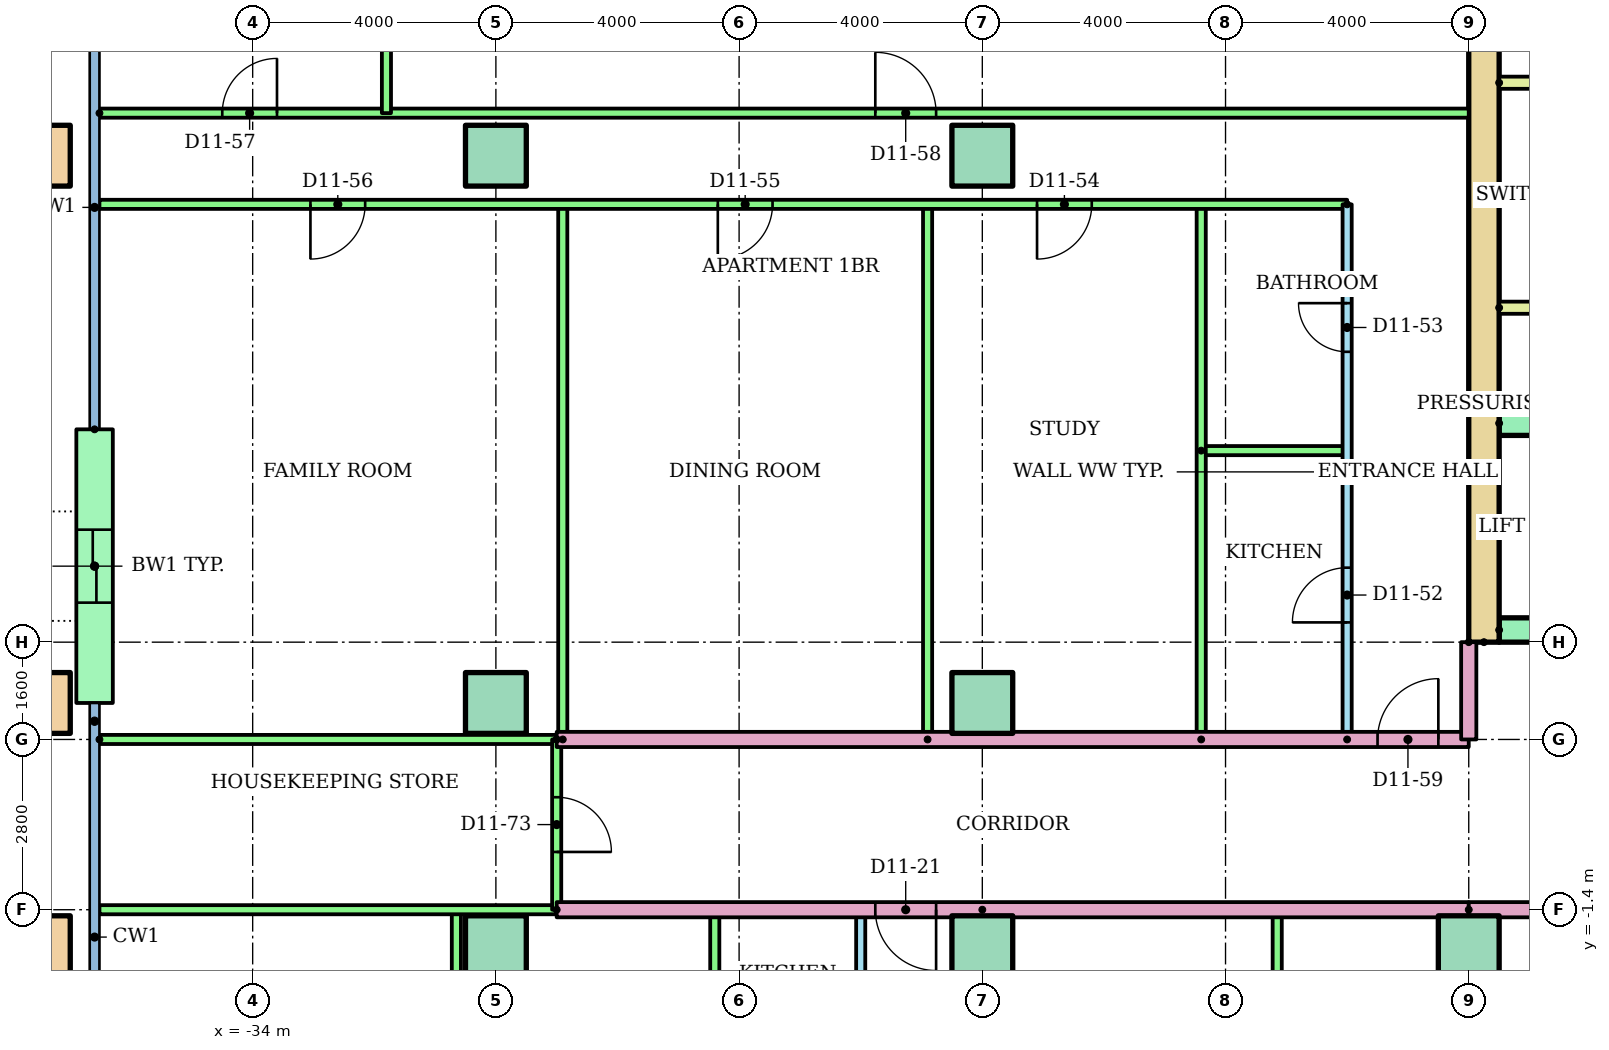
"""IFC4 building model, lengths in metres.
Left out: names, types, materials, properties, quantities, classifications, styles, units other than length and angle.
Written with IfcOpenShell. Run it as: python <this file> out.ifc"""

import sys

from ifc_helpers import new_model, si_unit, direction, frame, frame_2d, origin, origin_2d, place, context, subcontext, project, spatial, rectangle, hollow_rectangle, extrude, element, fill, save


model = new_model("IFC4")
c1 = context("Model", 3, precision=1e-05, world=origin(), true_north=direction((0.0, 1.0)))
c2 = subcontext(c1, "Body", "Model", "MODEL_VIEW")
j1 = project(units=[si_unit("LENGTHUNIT", "METRE"), si_unit("PLANEANGLEUNIT", "RADIAN")], contexts=[c1])
p1 = place(None, origin())
s1 = spatial("IfcSite", under=j1, at=p1, CompositionType="ELEMENT")
p2 = place(p1, origin())
s2 = spatial("IfcBuilding", under=s1, at=p2, CompositionType="ELEMENT")
p3 = place(p2, frame((0.0, 0.0, 44.8)))
s3 = spatial("IfcBuildingStorey", under=s2, at=p3, CompositionType="ELEMENT", Elevation=44.8)
p4 = place(p3, frame((-37.5, -2.0, 0.0)))
e1 = element("IfcColumn", 1, at=p4, inside=s3, PredefinedType="COLUMN", context=c2, shape_type="SweptSolid", body=[
    extrude(hollow_rectangle(XDim=1.0, YDim=1.0, WallThickness=0.05, at=origin_2d()), origin(), (0.0, 0.0, 1.0), 3.2),
])
for number, where in (
    (2, (-30.0, -2.0, 0.0)),
    (3, (-22.0, -2.0, 0.0)),
    (4, (-14.0, -2.0, 0.0)),
):
    element("IfcColumn", number, at=place(p3, frame(where)), inside=s3, PredefinedType="COLUMN", context=c2, shape_type="SweptSolid", body=[
        extrude(rectangle(XDim=1.0, YDim=1.0, at=origin_2d()), origin(), (0.0, 0.0, 1.0), 3.2),
    ])
p5 = place(p3, frame((-37.5, 2.0, 0.0)))
e5 = element("IfcColumn", 5, at=p5, inside=s3, PredefinedType="COLUMN", context=c2, shape_type="SweptSolid", body=[
    extrude(hollow_rectangle(XDim=1.0, YDim=1.0, WallThickness=0.05, at=origin_2d()), origin(), (0.0, 0.0, 1.0), 3.2),
])
for number, where in (
    (6, (-30.0, 2.0, 0.0)),
    (7, (-22.0, 2.0, 0.0)),
):
    element("IfcColumn", number, at=place(p3, frame(where)), inside=s3, PredefinedType="COLUMN", context=c2, shape_type="SweptSolid", body=[
        extrude(rectangle(XDim=1.0, YDim=1.0, at=origin_2d()), origin(), (0.0, 0.0, 1.0), 3.2),
    ])
p6 = place(p3, frame((-37.5, 11.0, 0.0)))
e8 = element("IfcColumn", 8, at=p6, inside=s3, PredefinedType="COLUMN", context=c2, shape_type="SweptSolid", body=[
    extrude(hollow_rectangle(XDim=1.0, YDim=1.0, WallThickness=0.05, at=origin_2d()), origin(), (0.0, 0.0, 1.0), 3.2),
])
for number, where in (
    (9, (-30.0, 11.0, 0.0)),
    (10, (-22.0, 11.0, 0.0)),
):
    element("IfcColumn", number, at=place(p3, frame(where)), inside=s3, PredefinedType="COLUMN", context=c2, shape_type="SweptSolid", body=[
        extrude(rectangle(XDim=1.0, YDim=1.0, at=origin_2d()), origin(), (0.0, 0.0, 1.0), 3.2),
    ])
p7 = place(p3, frame((-36.6, 6.5, 0.0), z_axis=(0.0, 0.0, 1.0), x_axis=(0.0, -1.0, 0.0)))
e11 = element("IfcWall", 11, at=p7, inside=s3, PredefinedType="STANDARD", context=c2, shape_type="SweptSolid", body=[
    extrude(rectangle(XDim=4.5, YDim=0.6, at=frame_2d((2.25, 0.0))), origin(), (0.0, 0.0, 1.0), 2.92),
])
p8 = place(p7, frame((1.65, 0.0, 0.0)))
e12 = element("IfcOpeningElement", 12, at=p8, cuts=e11, PredefinedType="OPENING", context=c2, shape_type="SweptSolid", body=[
    extrude(rectangle(XDim=1.2, YDim=2.1, at=frame_2d((0.6, 1.05))), frame((0.0, 0.31, 0.0), z_axis=(0.0, -1.0, 0.0), x_axis=(1.0, 0.0, 0.0)), (0.0, 0.0, 1.0), 0.62),
])
p9 = place(p3, frame((-13.75, 3.0, 0.0), z_axis=(0.0, 0.0, 1.0), x_axis=(0.0, 1.0, 0.0)))
e13 = element("IfcWall", 13, at=p9, inside=s3, PredefinedType="SHEAR", context=c2, shape_type="SweptSolid", body=[
    extrude(rectangle(XDim=17.0, YDim=0.5, at=frame_2d((8.5, 0.0))), origin(), (0.0, 0.0, 1.0), 2.92),
])
p10 = place(p3, frame((-13.5, 3.2, 0.0)))
e14 = element("IfcWall", 14, at=p10, inside=s3, PredefinedType="SHEAR", context=c2, shape_type="SweptSolid", body=[
    extrude(rectangle(XDim=27.0, YDim=0.4, at=frame_2d((13.5, 0.0))), origin(), (0.0, 0.0, 1.0), 2.92),
])
p11 = place(p10, frame((6.861, 0.0, 0.0)))
e15 = element("IfcOpeningElement", 15, at=p11, cuts=e14, PredefinedType="OPENING", context=c2, shape_type="SweptSolid", body=[
    extrude(rectangle(XDim=1.1, YDim=2.1, at=frame_2d((0.55, 1.05))), frame((0.0, 0.21, 0.0), z_axis=(0.0, -1.0, 0.0), x_axis=(1.0, 0.0, 0.0)), (0.0, 0.0, 1.0), 0.42),
])
p12 = place(p10, frame((9.906, 0.0, 0.0)))
e16 = element("IfcOpeningElement", 16, at=p12, cuts=e14, PredefinedType="OPENING", context=c2, shape_type="SweptSolid", body=[
    extrude(rectangle(XDim=1.1, YDim=2.1, at=frame_2d((0.55, 1.05))), frame((0.0, 0.21, 0.0), z_axis=(0.0, -1.0, 0.0), x_axis=(1.0, 0.0, 0.0)), (0.0, 0.0, 1.0), 0.42),
])
p13 = place(p10, frame((15.994, 0.0, 0.0)))
e17 = element("IfcOpeningElement", 17, at=p13, cuts=e14, PredefinedType="OPENING", context=c2, shape_type="SweptSolid", body=[
    extrude(rectangle(XDim=1.1, YDim=2.1, at=frame_2d((0.55, 1.05))), frame((0.0, 0.21, 0.0), z_axis=(0.0, -1.0, 0.0), x_axis=(1.0, 0.0, 0.0)), (0.0, 0.0, 1.0), 0.42),
])
p14 = place(p10, frame((19.039, 0.0, 0.0)))
e18 = element("IfcOpeningElement", 18, at=p14, cuts=e14, PredefinedType="OPENING", context=c2, shape_type="SweptSolid", body=[
    extrude(rectangle(XDim=1.1, YDim=2.1, at=frame_2d((0.55, 1.05))), frame((0.0, 0.21, 0.0), z_axis=(0.0, -1.0, 0.0), x_axis=(1.0, 0.0, 0.0)), (0.0, 0.0, 1.0), 0.42),
])
p15 = place(p10, frame((12.6, 0.0, 0.0)))
e19 = element("IfcOpeningElement", 19, at=p15, cuts=e14, PredefinedType="OPENING", context=c2, shape_type="SweptSolid", body=[
    extrude(rectangle(XDim=1.8, YDim=2.1, at=frame_2d((0.9, 1.05))), frame((0.0, 0.21, 0.0), z_axis=(0.0, -1.0, 0.0), x_axis=(1.0, 0.0, 0.0)), (0.0, 0.0, 1.0), 0.42),
])
p16 = place(p3, frame((-13.5, 6.6, 0.0)))
e20 = element("IfcWall", 20, at=p16, inside=s3, PredefinedType="SHEAR", context=c2, shape_type="SweptSolid", body=[
    extrude(rectangle(XDim=11.978, YDim=0.4, at=frame_2d((5.989, 0.0))), origin(), (0.0, 0.0, 1.0), 2.92),
])
for number, where in (
    (21, (-13.5, 8.5, 0.0)),
    (22, (-13.5, 12.2, 0.0)),
):
    element("IfcWall", number, at=place(p3, frame(where)), inside=s3, PredefinedType="PARTITIONING", context=c2, shape_type="SweptSolid", body=[
        extrude(rectangle(XDim=3.9, YDim=0.2, at=frame_2d((1.95, 0.0))), origin(), (0.0, 0.0, 1.0), 2.92),
    ])
p17 = place(p3, frame((-24.0, -7.8, 0.0), z_axis=(0.0, 0.0, 1.0), x_axis=(0.0, 1.0, 0.0)))
e23 = element("IfcWall", 23, at=p17, inside=s3, PredefinedType="PARTITIONING", context=c2, shape_type="SweptSolid", body=[
    extrude(rectangle(XDim=6.4, YDim=0.15, at=frame_2d((3.2, 0.0))), origin(), (0.0, 0.0, 1.0), 2.4),
])
p18 = place(p17, frame((4.14, 0.0, 0.0)))
e24 = element("IfcOpeningElement", 24, at=p18, cuts=e23, PredefinedType="OPENING", context=c2, shape_type="SweptSolid", body=[
    extrude(rectangle(XDim=0.9, YDim=2.1, at=frame_2d((0.45, 1.05))), frame((0.0, 0.085, 0.0), z_axis=(0.0, -1.0, 0.0), x_axis=(1.0, 0.0, 0.0)), (0.0, 0.0, 1.0), 0.17),
])
p19 = place(p17, frame((1.05, 0.0, 0.0)))
e25 = element("IfcOpeningElement", 25, at=p19, cuts=e23, PredefinedType="OPENING", context=c2, shape_type="SweptSolid", body=[
    extrude(rectangle(XDim=0.8, YDim=2.1, at=frame_2d((0.4, 1.05))), frame((0.0, 0.085, 0.0), z_axis=(0.0, -1.0, 0.0), x_axis=(1.0, 0.0, 0.0)), (0.0, 0.0, 1.0), 0.17),
])
for number, where, z_axis, x_axis in (
    (26, (-26.4, -7.8, 0.0), (0.0, 0.0, 1.0), (0.0, 1.0, 0.0)),
    (27, (-30.65, -7.8, 0.0), (0.0, 0.0, 1.0), (0.0, 1.0, 0.0)),
    (28, (-17.15, -7.8, 0.0), (0.0, 0.0, 1.0), (0.0, 1.0, 0.0)),
):
    element("IfcWall", number, at=place(p3, frame(where, z_axis=z_axis, x_axis=x_axis)), inside=s3, PredefinedType="PARTITIONING", context=c2, shape_type="SweptSolid", body=[
        extrude(rectangle(XDim=6.4, YDim=0.15, at=frame_2d((3.2, 0.0))), origin(), (0.0, 0.0, 1.0), 2.4),
    ])
p20 = place(p3, frame((-22.0, -1.4, 0.0), z_axis=(0.0, 0.0, 1.0), x_axis=(0.0, -1.0, 0.0)))
e29 = element("IfcWall", 29, at=p20, inside=s3, PredefinedType="PARTITIONING", context=c2, shape_type="SweptSolid", body=[
    extrude(rectangle(XDim=14.71, YDim=0.25, at=frame_2d((7.355, 0.0))), origin(), (0.0, 0.0, 1.0), 2.4),
])
p21 = place(p3, frame((-14.0, -1.4, 0.0), z_axis=(0.0, 0.0, 1.0), x_axis=(-1.0, 0.0, 0.0)))
e30 = element("IfcWall", 30, at=p21, inside=s3, PredefinedType="PARTITIONING", context=c2, shape_type="SweptSolid", body=[
    extrude(rectangle(XDim=15.0, YDim=0.25, at=frame_2d((7.5, 0.0))), origin(), (0.0, 0.0, 1.0), 2.4),
])
p22 = place(p21, frame((8.76, 0.0, 0.0)))
e31 = element("IfcOpeningElement", 31, at=p22, cuts=e30, PredefinedType="OPENING", context=c2, shape_type="SweptSolid", body=[
    extrude(rectangle(XDim=1.0, YDim=2.1, at=frame_2d((0.5, 1.05))), frame((0.0, 0.135, 0.0), z_axis=(0.0, -1.0, 0.0), x_axis=(1.0, 0.0, 0.0)), (0.0, 0.0, 1.0), 0.27),
])
p23 = place(p3, frame((-29.0, -1.4, 0.0), z_axis=(0.0, 0.0, 1.0), x_axis=(-1.0, 0.0, 0.0)))
e32 = element("IfcWall", 32, at=p23, inside=s3, PredefinedType="PARTITIONING", context=c2, shape_type="SweptSolid", body=[
    extrude(rectangle(XDim=7.52, YDim=0.15, at=frame_2d((3.76, 0.0))), origin(), (0.0, 0.0, 1.0), 2.4),
])
p24 = place(p3, frame((-16.0, 1.4, 0.0), z_axis=(0.0, 0.0, 1.0), x_axis=(0.0, 1.0, 0.0)))
e33 = element("IfcWall", 33, at=p24, inside=s3, PredefinedType="PARTITIONING", context=c2, shape_type="SweptSolid", body=[
    extrude(rectangle(XDim=8.8, YDim=0.15, at=frame_2d((4.4, 0.0))), origin(), (0.0, 0.0, 1.0), 2.4),
])
p25 = place(p24, frame((1.925, 0.0, 0.0)))
e34 = element("IfcOpeningElement", 34, at=p25, cuts=e33, PredefinedType="OPENING", context=c2, shape_type="SweptSolid", body=[
    extrude(rectangle(XDim=0.9, YDim=2.1, at=frame_2d((0.45, 1.05))), frame((0.0, 0.085, 0.0), z_axis=(0.0, -1.0, 0.0), x_axis=(1.0, 0.0, 0.0)), (0.0, 0.0, 1.0), 0.17),
])
p26 = place(p24, frame((6.375, 0.0, 0.0)))
e35 = element("IfcOpeningElement", 35, at=p26, cuts=e33, PredefinedType="OPENING", context=c2, shape_type="SweptSolid", body=[
    extrude(rectangle(XDim=0.8, YDim=2.1, at=frame_2d((0.4, 1.05))), frame((0.0, 0.085, 0.0), z_axis=(0.0, -1.0, 0.0), x_axis=(1.0, 0.0, 0.0)), (0.0, 0.0, 1.0), 0.17),
])
p27 = place(p3, frame((-18.4, 6.15, 0.0)))
e36 = element("IfcWall", 36, at=p27, inside=s3, PredefinedType="PARTITIONING", context=c2, shape_type="SweptSolid", body=[
    extrude(rectangle(XDim=2.4, YDim=0.15, at=frame_2d((1.2, 0.0))), origin(), (0.0, 0.0, 1.0), 2.4),
])
for number, where, z_axis, x_axis in (
    (37, (-18.4, 1.4, 0.0), (0.0, 0.0, 1.0), (0.0, 1.0, 0.0)),
    (38, (-22.9, 1.4, 0.0), (0.0, 0.0, 1.0), (0.0, 1.0, 0.0)),
    (39, (-28.9, 1.4, 0.0), (0.0, 0.0, 1.0), (0.0, 1.0, 0.0)),
):
    element("IfcWall", number, at=place(p3, frame(where, z_axis=z_axis, x_axis=x_axis)), inside=s3, PredefinedType="PARTITIONING", context=c2, shape_type="SweptSolid", body=[
        extrude(rectangle(XDim=8.8, YDim=0.15, at=frame_2d((4.4, 0.0))), origin(), (0.0, 0.0, 1.0), 2.4),
    ])
p28 = place(p3, frame((-16.0, 10.2, 0.0), z_axis=(0.0, 0.0, 1.0), x_axis=(-1.0, 0.0, 0.0)))
e40 = element("IfcWall", 40, at=p28, inside=s3, PredefinedType="PARTITIONING", context=c2, shape_type="SweptSolid", body=[
    extrude(rectangle(XDim=20.52, YDim=0.15, at=frame_2d((10.26, 0.0))), origin(), (0.0, 0.0, 1.0), 2.4),
])
p29 = place(p28, frame((4.2, 0.0, 0.0)))
e41 = element("IfcOpeningElement", 41, at=p29, cuts=e40, PredefinedType="OPENING", context=c2, shape_type="SweptSolid", body=[
    extrude(rectangle(XDim=0.9, YDim=2.1, at=frame_2d((0.45, 1.05))), frame((0.0, 0.085, 0.0), z_axis=(0.0, -1.0, 0.0), x_axis=(1.0, 0.0, 0.0)), (0.0, 0.0, 1.0), 0.17),
])
p30 = place(p28, frame((9.45, 0.0, 0.0)))
e42 = element("IfcOpeningElement", 42, at=p30, cuts=e40, PredefinedType="OPENING", context=c2, shape_type="SweptSolid", body=[
    extrude(rectangle(XDim=0.9, YDim=2.1, at=frame_2d((0.45, 1.05))), frame((0.0, 0.085, 0.0), z_axis=(0.0, -1.0, 0.0), x_axis=(1.0, 0.0, 0.0)), (0.0, 0.0, 1.0), 0.17),
])
p31 = place(p28, frame((16.15, 0.0, 0.0)))
e43 = element("IfcOpeningElement", 43, at=p31, cuts=e40, PredefinedType="OPENING", context=c2, shape_type="SweptSolid", body=[
    extrude(rectangle(XDim=0.9, YDim=2.1, at=frame_2d((0.45, 1.05))), frame((0.0, 0.085, 0.0), z_axis=(0.0, -1.0, 0.0), x_axis=(1.0, 0.0, 0.0)), (0.0, 0.0, 1.0), 0.17),
])
p32 = place(p3, frame((-36.52, 11.7, 0.0)))
e44 = element("IfcWall", 44, at=p32, inside=s3, PredefinedType="PARTITIONING", context=c2, shape_type="SweptSolid", body=[
    extrude(rectangle(XDim=22.52, YDim=0.15, at=frame_2d((11.26, 0.0))), origin(), (0.0, 0.0, 1.0), 2.4),
])
p33 = place(p32, frame((2.02, 0.0, 0.0)))
e45 = element("IfcOpeningElement", 45, at=p33, cuts=e44, PredefinedType="OPENING", context=c2, shape_type="SweptSolid", body=[
    extrude(rectangle(XDim=0.9, YDim=2.1, at=frame_2d((0.45, 1.05))), frame((0.0, 0.085, 0.0), z_axis=(0.0, -1.0, 0.0), x_axis=(1.0, 0.0, 0.0)), (0.0, 0.0, 1.0), 0.17),
])
p34 = place(p32, frame((12.76, 0.0, 0.0)))
e46 = element("IfcOpeningElement", 46, at=p34, cuts=e44, PredefinedType="OPENING", context=c2, shape_type="SweptSolid", body=[
    extrude(rectangle(XDim=1.0, YDim=2.1, at=frame_2d((0.5, 1.05))), frame((0.0, 0.085, 0.0), z_axis=(0.0, -1.0, 0.0), x_axis=(1.0, 0.0, 0.0)), (0.0, 0.0, 1.0), 0.17),
])
p35 = place(p3, frame((-31.8, 16.72, 0.0), z_axis=(0.0, 0.0, 1.0), x_axis=(0.0, -1.0, 0.0)))
e47 = element("IfcWall", 47, at=p35, inside=s3, PredefinedType="PARTITIONING", context=c2, shape_type="SweptSolid", body=[
    extrude(rectangle(XDim=5.02, YDim=0.15, at=frame_2d((2.51, 0.0))), origin(), (0.0, 0.0, 1.0), 2.4),
])
p36 = place(p3, frame((-29.0, 1.4, 0.0)))
e48 = element("IfcWall", 48, at=p36, inside=s3, PredefinedType="PARTITIONING", context=c2, shape_type="SweptSolid", body=[
    extrude(rectangle(XDim=15.0, YDim=0.25, at=frame_2d((7.5, 0.0))), origin(), (0.0, 0.0, 1.0), 2.4),
])
p37 = place(p36, frame((13.5, 0.0, 0.0)))
e49 = element("IfcOpeningElement", 49, at=p37, cuts=e48, PredefinedType="OPENING", context=c2, shape_type="SweptSolid", body=[
    extrude(rectangle(XDim=1.0, YDim=2.1, at=frame_2d((0.5, 1.05))), frame((0.0, 0.135, 0.0), z_axis=(0.0, -1.0, 0.0), x_axis=(1.0, 0.0, 0.0)), (0.0, 0.0, 1.0), 0.27),
])
p38 = place(p3, frame((-36.52, 1.4, 0.0)))
e50 = element("IfcWall", 50, at=p38, inside=s3, PredefinedType="PARTITIONING", context=c2, shape_type="SweptSolid", body=[
    extrude(rectangle(XDim=7.52, YDim=0.15, at=frame_2d((3.76, 0.0))), origin(), (0.0, 0.0, 1.0), 2.4),
])
p39 = place(p3, frame((-29.0, 1.4, 0.0), z_axis=(0.0, 0.0, 1.0), x_axis=(0.0, -1.0, 0.0)))
e51 = element("IfcWall", 51, at=p39, inside=s3, PredefinedType="PARTITIONING", context=c2, shape_type="SweptSolid", body=[
    extrude(rectangle(XDim=2.8, YDim=0.15, at=frame_2d((1.4, 0.0))), origin(), (0.0, 0.0, 1.0), 2.4),
])
p40 = place(p39, frame((0.95, 0.0, 0.0)))
e52 = element("IfcOpeningElement", 52, at=p40, cuts=e51, PredefinedType="OPENING", context=c2, shape_type="SweptSolid", body=[
    extrude(rectangle(XDim=0.9, YDim=2.1, at=frame_2d((0.45, 1.05))), frame((0.0, 0.085, 0.0), z_axis=(0.0, -1.0, 0.0), x_axis=(1.0, 0.0, 0.0)), (0.0, 0.0, 1.0), 0.17),
])
p41 = place(p3, frame((14.0, -1.4, 0.0), z_axis=(0.0, 0.0, 1.0), x_axis=(-1.0, 0.0, 0.0)))
e53 = element("IfcWall", 53, at=p41, inside=s3, PredefinedType="PARTITIONING", context=c2, shape_type="SweptSolid", body=[
    extrude(rectangle(XDim=28.0, YDim=0.25, at=frame_2d((14.0, 0.0))), origin(), (0.0, 0.0, 1.0), 2.4),
])
p42 = place(p41, frame((12.76, 0.0, 0.0)))
e54 = element("IfcOpeningElement", 54, at=p42, cuts=e53, PredefinedType="OPENING", context=c2, shape_type="SweptSolid", body=[
    extrude(rectangle(XDim=1.0, YDim=2.1, at=frame_2d((0.5, 1.05))), frame((0.0, 0.135, 0.0), z_axis=(0.0, -1.0, 0.0), x_axis=(1.0, 0.0, 0.0)), (0.0, 0.0, 1.0), 0.27),
])
p43 = place(p41, frame((10.24, 0.0, 0.0)))
e55 = element("IfcOpeningElement", 55, at=p43, cuts=e53, PredefinedType="OPENING", context=c2, shape_type="SweptSolid", body=[
    extrude(rectangle(XDim=1.0, YDim=2.1, at=frame_2d((0.5, 1.05))), frame((0.0, 0.135, 0.0), z_axis=(0.0, -1.0, 0.0), x_axis=(1.0, 0.0, 0.0)), (0.0, 0.0, 1.0), 0.27),
])
p44 = place(p3, frame((-14.0, 3.0, 0.0), z_axis=(0.0, 0.0, 1.0), x_axis=(0.0, -1.0, 0.0)))
e56 = element("IfcWall", 56, at=p44, inside=s3, PredefinedType="PARTITIONING", context=c2, shape_type="SweptSolid", body=[
    extrude(rectangle(XDim=1.6, YDim=0.25, at=frame_2d((0.8, 0.0))), origin(), (0.0, 0.0, 1.0), 2.4),
])
p45 = place(p22, origin())
e57 = element("IfcDoor", 57, at=p45, inside=s3, OperationType="SINGLE_SWING_LEFT", PredefinedType="DOOR", context=c2, shape_type="SweptSolid", body=[
    extrude(rectangle(XDim=1.0, YDim=2.1, at=frame_2d((0.5, 1.05))), frame((0.0, 0.025, 0.0), z_axis=(0.0, -1.0, 0.0), x_axis=(1.0, 0.0, 0.0)), (0.0, 0.0, 1.0), 0.05),
])
fill(e31, e57)
p46 = place(p25, origin())
e58 = element("IfcDoor", 58, at=p46, inside=s3, OperationType="SINGLE_SWING_LEFT", PredefinedType="DOOR", context=c2, shape_type="SweptSolid", body=[
    extrude(rectangle(XDim=0.9, YDim=2.1, at=frame_2d((0.45, 1.05))), frame((0.0, 0.025, 0.0), z_axis=(0.0, -1.0, 0.0), x_axis=(1.0, 0.0, 0.0)), (0.0, 0.0, 1.0), 0.05),
])
fill(e34, e58)
p47 = place(p26, origin())
e59 = element("IfcDoor", 59, at=p47, inside=s3, OperationType="SINGLE_SWING_RIGHT", PredefinedType="DOOR", context=c2, shape_type="SweptSolid", body=[
    extrude(rectangle(XDim=0.8, YDim=2.1, at=frame_2d((0.4, 1.05))), frame((0.0, 0.025, 0.0), z_axis=(0.0, -1.0, 0.0), x_axis=(1.0, 0.0, 0.0)), (0.0, 0.0, 1.0), 0.05),
])
fill(e35, e59)
p48 = place(p29, origin())
e60 = element("IfcDoor", 60, at=p48, inside=s3, OperationType="SINGLE_SWING_RIGHT", PredefinedType="DOOR", context=c2, shape_type="SweptSolid", body=[
    extrude(rectangle(XDim=0.9, YDim=2.1, at=frame_2d((0.45, 1.05))), frame((0.0, 0.025, 0.0), z_axis=(0.0, -1.0, 0.0), x_axis=(1.0, 0.0, 0.0)), (0.0, 0.0, 1.0), 0.05),
])
fill(e41, e60)
p49 = place(p30, origin())
e61 = element("IfcDoor", 61, at=p49, inside=s3, OperationType="SINGLE_SWING_RIGHT", PredefinedType="DOOR", context=c2, shape_type="SweptSolid", body=[
    extrude(rectangle(XDim=0.9, YDim=2.1, at=frame_2d((0.45, 1.05))), frame((0.0, 0.025, 0.0), z_axis=(0.0, -1.0, 0.0), x_axis=(1.0, 0.0, 0.0)), (0.0, 0.0, 1.0), 0.05),
])
fill(e42, e61)
p50 = place(p31, origin())
e62 = element("IfcDoor", 62, at=p50, inside=s3, OperationType="SINGLE_SWING_RIGHT", PredefinedType="DOOR", context=c2, shape_type="SweptSolid", body=[
    extrude(rectangle(XDim=0.9, YDim=2.1, at=frame_2d((0.45, 1.05))), frame((0.0, 0.025, 0.0), z_axis=(0.0, -1.0, 0.0), x_axis=(1.0, 0.0, 0.0)), (0.0, 0.0, 1.0), 0.05),
])
fill(e43, e62)
p51 = place(p33, origin())
e63 = element("IfcDoor", 63, at=p51, inside=s3, OperationType="SINGLE_SWING_RIGHT", PredefinedType="DOOR", context=c2, shape_type="SweptSolid", body=[
    extrude(rectangle(XDim=0.9, YDim=2.1, at=frame_2d((0.45, 1.05))), frame((0.0, 0.025, 0.0), z_axis=(0.0, -1.0, 0.0), x_axis=(1.0, 0.0, 0.0)), (0.0, 0.0, 1.0), 0.05),
])
fill(e45, e63)
p52 = place(p34, origin())
e64 = element("IfcDoor", 64, at=p52, inside=s3, OperationType="SINGLE_SWING_LEFT", PredefinedType="DOOR", context=c2, shape_type="SweptSolid", body=[
    extrude(rectangle(XDim=1.0, YDim=2.1, at=frame_2d((0.5, 1.05))), frame((0.0, 0.025, 0.0), z_axis=(0.0, -1.0, 0.0), x_axis=(1.0, 0.0, 0.0)), (0.0, 0.0, 1.0), 0.05),
])
fill(e46, e64)
p53 = place(p37, origin())
e65 = element("IfcDoor", 65, at=p53, inside=s3, OperationType="SINGLE_SWING_RIGHT", PredefinedType="DOOR", context=c2, shape_type="SweptSolid", body=[
    extrude(rectangle(XDim=1.0, YDim=2.1, at=frame_2d((0.5, 1.05))), frame((0.0, 0.025, 0.0), z_axis=(0.0, -1.0, 0.0), x_axis=(1.0, 0.0, 0.0)), (0.0, 0.0, 1.0), 0.05),
])
fill(e49, e65)
p54 = place(p40, origin())
e66 = element("IfcDoor", 66, at=p54, inside=s3, OperationType="SINGLE_SWING_RIGHT", PredefinedType="DOOR", context=c2, shape_type="SweptSolid", body=[
    extrude(rectangle(XDim=0.9, YDim=2.1, at=frame_2d((0.45, 1.05))), frame((0.0, 0.025, 0.0), z_axis=(0.0, -1.0, 0.0), x_axis=(1.0, 0.0, 0.0)), (0.0, 0.0, 1.0), 0.05),
])
fill(e52, e66)
p55 = place(p8, origin())
e67 = element("IfcDoor", 67, at=p55, inside=s3, OperationType="SLIDING_TO_LEFT", PredefinedType="DOOR", context=c2, shape_type="SweptSolid", body=[
    extrude(rectangle(XDim=1.2, YDim=2.1, at=frame_2d((0.6, 1.05))), frame((0.0, 0.025, 0.0), z_axis=(0.0, -1.0, 0.0), x_axis=(1.0, 0.0, 0.0)), (0.0, 0.0, 1.0), 0.05),
])
fill(e12, e67)
save(model, sys.argv[1])
